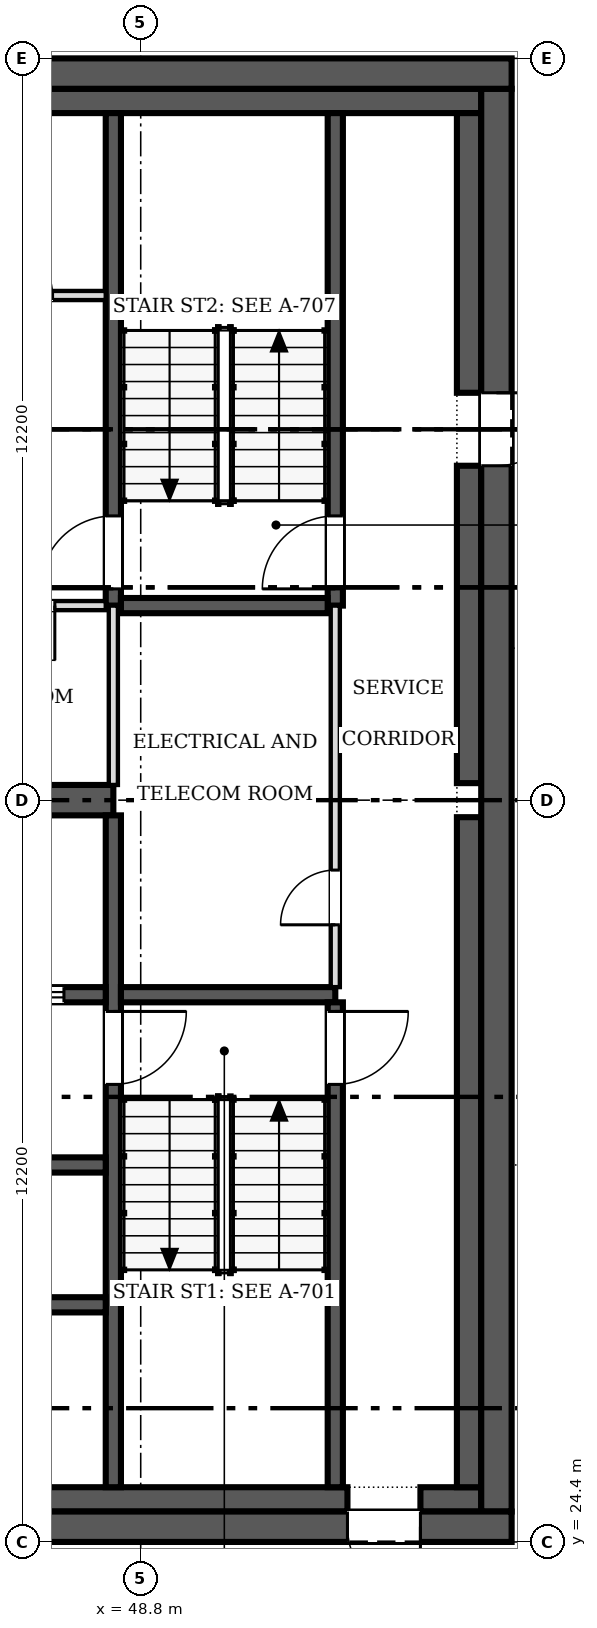
"""IFC4 building model, lengths in metres.
Left out: names, types, materials, properties, quantities, classifications, styles, units other than length and angle.
Written with IfcOpenShell. Run it as: python <this file> out.ifc"""

import sys

from ifc_helpers import new_model, si_unit, direction, frame, frame_2d, origin, place, context, subcontext, project, spatial, rectangle, extrude, source, transform, mapped, element, fill, save


model = new_model("IFC4")
c1 = context("Model", 3, precision=1e-05, world=origin(), true_north=direction((0.0, 1.0)))
c2 = subcontext(c1, "Body", "Model", "MODEL_VIEW")
j1 = project(units=[si_unit("LENGTHUNIT", "METRE"), si_unit("PLANEANGLEUNIT", "RADIAN")], contexts=[c1])
p1 = place(None, origin())
s1 = spatial("IfcSite", under=j1, at=p1, CompositionType="ELEMENT")
p2 = place(p1, origin())
s2 = spatial("IfcBuilding", under=s1, at=p2, CompositionType="ELEMENT")
p3 = place(p2, frame((0.0, 0.0, 228.3)))
s3 = spatial("IfcBuildingStorey", under=s2, at=p3, CompositionType="ELEMENT", Elevation=228.3)
p4 = place(p3, frame((54.9, 24.65, 0.0), z_axis=(0.0, 0.0, 1.0), x_axis=(-1.0, 0.0, 0.0)))
e1 = element("IfcWall", 1, at=p4, inside=s3, PredefinedType="SHEAR", context=c2, shape_type="SweptSolid", body=[
    extrude(rectangle(XDim=24.4, YDim=0.5, at=frame_2d((12.2, 0.0))), origin(), (0.0, 0.0, 1.0), 3.8),
])
m1 = source(origin(), c2, "Body", "SweptSolid", [
    extrude(rectangle(XDim=1.2, YDim=2.1, at=frame_2d((0.6, 1.05))), frame((0.0, 0.26, 0.0), z_axis=(0.0, -1.0, 0.0), x_axis=(1.0, 0.0, 0.0)), (0.0, 0.0, 1.0), 0.52),
])
p5 = place(p4, frame((1.5, 0.0, 0.0)))
e2 = element("IfcOpeningElement", 2, at=p5, cuts=e1, PredefinedType="OPENING", context=c2, shape_type="MappedRepresentation", body=[
    mapped(m1, transform((0.0, 0.0, 0.0), scale=1.0)),
])
p6 = place(p3, frame((30.5, 48.55, 0.0), z_axis=(0.0, 0.0, 1.0), x_axis=(1.0, 0.0, 0.0)))
e3 = element("IfcWall", 3, at=p6, inside=s3, PredefinedType="SHEAR", context=c2, shape_type="SweptSolid", body=[
    extrude(rectangle(XDim=24.4, YDim=0.5, at=frame_2d((12.2, 0.0))), origin(), (0.0, 0.0, 1.0), 3.8),
])
p7 = place(p3, frame((54.65, 48.3, 0.0), z_axis=(0.0, 0.0, 1.0), x_axis=(0.0, -1.0, 0.0)))
e4 = element("IfcWall", 4, at=p7, inside=s3, PredefinedType="SHEAR", context=c2, shape_type="SweptSolid", body=[
    extrude(rectangle(XDim=23.4, YDim=0.5, at=frame_2d((11.7, 0.0))), origin(), (0.0, 0.0, 1.0), 3.8),
])
p8 = place(p7, frame((5.0, 0.0, 0.0)))
e5 = element("IfcOpeningElement", 5, at=p8, cuts=e4, PredefinedType="OPENING", context=c2, shape_type="MappedRepresentation", body=[
    mapped(m1, transform((0.0, 0.0, 0.0), scale=1.0)),
])
p9 = place(p3, frame((31.0, 25.1, 0.0), z_axis=(0.0, 0.0, 1.0), x_axis=(1.0, 0.0, 0.0)))
e6 = element("IfcWall", 6, at=p9, inside=s3, PredefinedType="SOLIDWALL", context=c2, shape_type="SweptSolid", body=[
    extrude(rectangle(XDim=21.2, YDim=0.4, at=frame_2d((10.6, 0.0))), origin(), (0.0, 0.0, 1.0), 3.8),
])
p10 = place(p3, frame((53.4, 25.1, 0.0), z_axis=(0.0, 0.0, 1.0), x_axis=(1.0, 0.0, 0.0)))
e7 = element("IfcWall", 7, at=p10, inside=s3, PredefinedType="SOLIDWALL", context=c2, shape_type="SweptSolid", body=[
    extrude(rectangle(XDim=1.0, YDim=0.4, at=frame_2d((0.5, 0.0))), origin(), (0.0, 0.0, 1.0), 3.8),
])
p11 = place(p3, frame((31.0, 48.1, 0.0), z_axis=(0.0, 0.0, 1.0), x_axis=(1.0, 0.0, 0.0)))
e8 = element("IfcWall", 8, at=p11, inside=s3, PredefinedType="SOLIDWALL", context=c2, shape_type="SweptSolid", body=[
    extrude(rectangle(XDim=23.4, YDim=0.4, at=frame_2d((11.7, 0.0))), origin(), (0.0, 0.0, 1.0), 3.8),
])
p12 = place(p3, frame((54.2, 25.3, 0.0), z_axis=(0.0, 0.0, 1.0), x_axis=(0.0, 1.0, 0.0)))
e9 = element("IfcWall", 9, at=p12, inside=s3, PredefinedType="SOLIDWALL", context=c2, shape_type="SweptSolid", body=[
    extrude(rectangle(XDim=11.02, YDim=0.4, at=frame_2d((5.51, 0.0))), origin(), (0.0, 0.0, 1.0), 3.8),
])
p13 = place(p3, frame((54.2, 36.88, 0.0), z_axis=(0.0, 0.0, 1.0), x_axis=(0.0, 1.0, 0.0)))
e10 = element("IfcWall", 10, at=p13, inside=s3, PredefinedType="SOLIDWALL", context=c2, shape_type="SweptSolid", body=[
    extrude(rectangle(XDim=5.22, YDim=0.4, at=frame_2d((2.61, 0.0))), origin(), (0.0, 0.0, 1.0), 3.8),
])
p14 = place(p3, frame((54.2, 43.3, 0.0), z_axis=(0.0, 0.0, 1.0), x_axis=(0.0, 1.0, 0.0)))
e11 = element("IfcWall", 11, at=p14, inside=s3, PredefinedType="SOLIDWALL", context=c2, shape_type="SweptSolid", body=[
    extrude(rectangle(XDim=4.6, YDim=0.4, at=frame_2d((2.3, 0.0))), origin(), (0.0, 0.0, 1.0), 3.8),
])
p15 = place(p3, frame((31.4, 36.6, 0.0), z_axis=(0.0, 0.0, 1.0), x_axis=(1.0, 0.0, 0.0)))
e12 = element("IfcWall", 12, at=p15, inside=s3, PredefinedType="SHEAR", context=c2, shape_type="SweptSolid", body=[
    extrude(rectangle(XDim=16.95, YDim=0.5, at=frame_2d((8.475, 0.0))), origin(), (0.0, 0.0, 1.0), 3.8),
])
p16 = place(p3, frame((48.35, 36.35, 0.0), z_axis=(0.0, 0.0, 1.0), x_axis=(0.0, -1.0, 0.0)))
e13 = element("IfcWall", 13, at=p16, inside=s3, PredefinedType="SOLIDWALL", context=c2, shape_type="SweptSolid", body=[
    extrude(rectangle(XDim=11.05, YDim=0.25, at=frame_2d((5.525, 0.0))), origin(), (0.0, 0.0, 1.0), 3.8),
])
m2 = source(origin(), c2, "Body", "SweptSolid", [
    extrude(rectangle(XDim=1.2, YDim=2.1, at=frame_2d((0.6, 1.05))), frame((0.0, 0.135, 0.0), z_axis=(0.0, -1.0, 0.0), x_axis=(1.0, 0.0, 0.0)), (0.0, 0.0, 1.0), 0.27),
])
p17 = place(p16, frame((3.225, 0.0, 0.0)))
e14 = element("IfcOpeningElement", 14, at=p17, cuts=e13, PredefinedType="OPENING", context=c2, shape_type="MappedRepresentation", body=[
    mapped(m2, transform((0.0, 0.0, 0.0), scale=1.0)),
])
p18 = place(p3, frame((48.225, 33.4, 0.0), z_axis=(0.0, 0.0, 1.0), x_axis=(-1.0, 0.0, 0.0)))
e15 = element("IfcWall", 15, at=p18, inside=s3, PredefinedType="SOLIDWALL", context=c2, shape_type="SweptSolid", body=[
    extrude(rectangle(XDim=5.275, YDim=0.25, at=frame_2d((2.638, 0.0))), origin(), (0.0, 0.0, 1.0), 3.8),
])
p19 = place(p18, frame((3.512, 0.0, 0.0)))
e16 = element("IfcOpeningElement", 16, at=p19, cuts=e15, PredefinedType="OPENING", context=c2, shape_type="MappedRepresentation", body=[
    mapped(m2, transform((0.0, 0.0, 0.0), scale=1.0)),
])
p20 = place(p18, frame((0.688, 0.0, 0.0)))
e17 = element("IfcOpeningElement", 17, at=p20, cuts=e15, PredefinedType="OPENING", context=c2, shape_type="MappedRepresentation", body=[
    mapped(m2, transform((0.0, 0.0, 0.0), scale=1.0)),
])
p21 = place(p3, frame((48.475, 33.4, 0.0), z_axis=(0.0, 0.0, 1.0), x_axis=(1.0, 0.0, 0.0)))
e18 = element("IfcWall", 18, at=p21, inside=s3, PredefinedType="SOLIDWALL", context=c2, shape_type="SweptSolid", body=[
    extrude(rectangle(XDim=3.525, YDim=0.25, at=frame_2d((1.762, 0.0))), origin(), (0.0, 0.0, 1.0), 3.8),
])
p22 = place(p3, frame((48.35, 47.9, 0.0), z_axis=(0.0, 0.0, 1.0), x_axis=(0.0, -1.0, 0.0)))
e19 = element("IfcWall", 19, at=p22, inside=s3, PredefinedType="SOLIDWALL", context=c2, shape_type="SweptSolid", body=[
    extrude(rectangle(XDim=8.1, YDim=0.25, at=frame_2d((4.05, 0.0))), origin(), (0.0, 0.0, 1.0), 3.8),
])
p23 = place(p22, frame((6.625, 0.0, 0.0)))
e20 = element("IfcOpeningElement", 20, at=p23, cuts=e19, PredefinedType="OPENING", context=c2, shape_type="MappedRepresentation", body=[
    mapped(m2, transform((0.0, 0.0, 0.0), scale=1.0)),
])
p24 = place(p3, frame((52.0, 25.3, 0.0), z_axis=(0.0, 0.0, 1.0), x_axis=(0.0, 1.0, 0.0)))
e21 = element("IfcWall", 21, at=p24, inside=s3, PredefinedType="SOLIDWALL", context=c2, shape_type="SweptSolid", body=[
    extrude(rectangle(XDim=7.975, YDim=0.25, at=frame_2d((3.987, 0.0))), origin(), (0.0, 0.0, 1.0), 3.8),
])
p25 = place(p24, frame((6.625, 0.0, 0.0)))
e22 = element("IfcOpeningElement", 22, at=p25, cuts=e21, PredefinedType="OPENING", context=c2, shape_type="MappedRepresentation", body=[
    mapped(m2, transform((0.0, 0.0, 0.0), scale=1.0)),
])
p26 = place(p3, frame((52.0, 39.8, 0.0), z_axis=(0.0, 0.0, 1.0), x_axis=(0.0, 1.0, 0.0)))
e23 = element("IfcWall", 23, at=p26, inside=s3, PredefinedType="SOLIDWALL", context=c2, shape_type="SweptSolid", body=[
    extrude(rectangle(XDim=8.1, YDim=0.25, at=frame_2d((4.05, 0.0))), origin(), (0.0, 0.0, 1.0), 3.8),
])
p27 = place(p26, frame((0.275, 0.0, 0.0)))
e24 = element("IfcOpeningElement", 24, at=p27, cuts=e23, PredefinedType="OPENING", context=c2, shape_type="MappedRepresentation", body=[
    mapped(m2, transform((0.0, 0.0, 0.0), scale=1.0)),
])
for number, where, z_axis, x_axis in (
    (25, (42.95, 28.3, 0.0), (0.0, 0.0, 1.0), (1.0, 0.0, 0.0)),
    (26, (42.95, 30.6, 0.0), (0.0, 0.0, 1.0), (1.0, 0.0, 0.0)),
):
    element("IfcWall", number, at=place(p3, frame(where, z_axis=z_axis, x_axis=x_axis)), inside=s3, PredefinedType="SOLIDWALL", context=c2, shape_type="SweptSolid", body=[
        extrude(rectangle(XDim=5.275, YDim=0.25, at=frame_2d((2.638, 0.0))), origin(), (0.0, 0.0, 1.0), 3.8),
    ])
p28 = place(p3, frame((48.475, 39.8, 0.0), z_axis=(0.0, 0.0, 1.0), x_axis=(1.0, 0.0, 0.0)))
e27 = element("IfcWall", 27, at=p28, inside=s3, PredefinedType="SOLIDWALL", context=c2, shape_type="SweptSolid", body=[
    extrude(rectangle(XDim=3.4, YDim=0.25, at=frame_2d((1.7, 0.0))), origin(), (0.0, 0.0, 1.0), 3.8),
])
p29 = place(p3, frame((52.0, 33.525, 0.0), z_axis=(0.0, 0.0, 1.0), x_axis=(0.0, 1.0, 0.0)))
e28 = element("IfcWall", 28, at=p29, inside=s3, PredefinedType="PARTITIONING", context=c2, shape_type="SweptSolid", body=[
    extrude(rectangle(XDim=6.275, YDim=0.15, at=frame_2d((3.138, 0.0))), origin(), (0.0, 0.0, 1.0), 3.5),
])
m3 = source(origin(), c2, "Body", "SweptSolid", [
    extrude(rectangle(XDim=0.9, YDim=2.1, at=frame_2d((0.45, 1.05))), frame((0.0, 0.085, 0.0), z_axis=(0.0, -1.0, 0.0), x_axis=(1.0, 0.0, 0.0)), (0.0, 0.0, 1.0), 0.17),
])
p30 = place(p29, frame((1.025, 0.0, 0.0)))
e29 = element("IfcOpeningElement", 29, at=p30, cuts=e28, PredefinedType="OPENING", context=c2, shape_type="MappedRepresentation", body=[
    mapped(m3, transform((0.0, 0.0, 0.0), scale=1.0)),
])
p31 = place(p3, frame((48.35, 36.85, 0.0), z_axis=(0.0, 0.0, 1.0), x_axis=(0.0, 1.0, 0.0)))
e30 = element("IfcWall", 30, at=p31, inside=s3, PredefinedType="PARTITIONING", context=c2, shape_type="SweptSolid", body=[
    extrude(rectangle(XDim=2.95, YDim=0.15, at=frame_2d((1.475, 0.0))), origin(), (0.0, 0.0, 1.0), 3.5),
])
p32 = place(p3, frame((48.225, 39.8, 0.0), z_axis=(0.0, 0.0, 1.0), x_axis=(-1.0, 0.0, 0.0)))
e31 = element("IfcWall", 31, at=p32, inside=s3, PredefinedType="PARTITIONING", context=c2, shape_type="SweptSolid", body=[
    extrude(rectangle(XDim=2.625, YDim=0.15, at=frame_2d((1.312, 0.0))), origin(), (0.0, 0.0, 1.0), 3.5),
])
p33 = place(p32, frame((0.837, 0.0, 0.0)))
e32 = element("IfcOpeningElement", 32, at=p33, cuts=e31, PredefinedType="OPENING", context=c2, shape_type="MappedRepresentation", body=[
    mapped(m3, transform((0.0, 0.0, 0.0), scale=1.0)),
])
p34 = place(p3, frame((45.6, 44.9, 0.0), z_axis=(0.0, 0.0, 1.0), x_axis=(1.0, 0.0, 0.0)))
e33 = element("IfcWall", 33, at=p34, inside=s3, PredefinedType="PARTITIONING", context=c2, shape_type="SweptSolid", body=[
    extrude(rectangle(XDim=2.625, YDim=0.15, at=frame_2d((1.312, 0.0))), origin(), (0.0, 0.0, 1.0), 3.5),
])
p35 = place(p34, frame((0.85, 0.0, 0.0)))
e34 = element("IfcOpeningElement", 34, at=p35, cuts=e33, PredefinedType="OPENING", context=c2, shape_type="MappedRepresentation", body=[
    mapped(m3, transform((0.0, 0.0, 0.0), scale=1.0)),
])
m4 = source(origin(), c2, "Body", "SweptSolid", [
    extrude(rectangle(XDim=1.2, YDim=2.1, at=frame_2d((0.6, 1.05))), frame((0.0, 0.025, 0.0), z_axis=(0.0, -1.0, 0.0), x_axis=(1.0, 0.0, 0.0)), (0.0, 0.0, 1.0), 0.05),
])
p36 = place(p5, origin())
e35 = element("IfcDoor", 35, at=p36, inside=s3, OperationType="SINGLE_SWING_LEFT", PredefinedType="DOOR", context=c2, shape_type="MappedRepresentation", body=[
    mapped(m4, transform((0.0, 0.0, 0.0), scale=1.0)),
])
fill(e2, e35)
p37 = place(p8, origin())
e36 = element("IfcDoor", 36, at=p37, inside=s3, OperationType="SINGLE_SWING_LEFT", PredefinedType="DOOR", context=c2, shape_type="MappedRepresentation", body=[
    mapped(m4, transform((0.0, 0.0, 0.0), scale=1.0)),
])
fill(e5, e36)
p38 = place(p17, origin())
e37 = element("IfcDoor", 37, at=p38, inside=s3, OperationType="SINGLE_SWING_LEFT", PredefinedType="DOOR", context=c2, shape_type="MappedRepresentation", body=[
    mapped(m4, transform((0.0, 0.0, 0.0), scale=1.0)),
])
fill(e14, e37)
p39 = place(p20, origin())
e38 = element("IfcDoor", 38, at=p39, inside=s3, OperationType="DOUBLE_DOOR_SLIDING", PredefinedType="DOOR", context=c2, shape_type="MappedRepresentation", body=[
    mapped(m4, transform((0.0, 0.0, 0.0), scale=1.0)),
])
fill(e17, e38)
p40 = place(p23, origin())
e39 = element("IfcDoor", 39, at=p40, inside=s3, OperationType="SINGLE_SWING_RIGHT", PredefinedType="DOOR", context=c2, shape_type="MappedRepresentation", body=[
    mapped(m4, transform((0.0, 0.0, 0.0), scale=1.0)),
])
fill(e20, e39)
p41 = place(p25, origin())
e40 = element("IfcDoor", 40, at=p41, inside=s3, OperationType="SINGLE_SWING_RIGHT", PredefinedType="DOOR", context=c2, shape_type="MappedRepresentation", body=[
    mapped(m4, transform((0.0, 0.0, 0.0), scale=1.0)),
])
fill(e22, e40)
p42 = place(p27, origin())
e41 = element("IfcDoor", 41, at=p42, inside=s3, OperationType="SINGLE_SWING_LEFT", PredefinedType="DOOR", context=c2, shape_type="MappedRepresentation", body=[
    mapped(m4, transform((0.0, 0.0, 0.0), scale=1.0)),
])
fill(e24, e41)
m5 = source(origin(), c2, "Body", "SweptSolid", [
    extrude(rectangle(XDim=0.9, YDim=2.1, at=frame_2d((0.45, 1.05))), frame((0.0, 0.025, 0.0), z_axis=(0.0, -1.0, 0.0), x_axis=(1.0, 0.0, 0.0)), (0.0, 0.0, 1.0), 0.05),
])
p43 = place(p30, origin())
e42 = element("IfcDoor", 42, at=p43, inside=s3, OperationType="SINGLE_SWING_LEFT", PredefinedType="DOOR", context=c2, shape_type="MappedRepresentation", body=[
    mapped(m5, transform((0.0, 0.0, 0.0), scale=1.0)),
])
fill(e29, e42)
p44 = place(p33, origin())
e43 = element("IfcDoor", 43, at=p44, inside=s3, OperationType="SINGLE_SWING_LEFT", PredefinedType="DOOR", context=c2, shape_type="MappedRepresentation", body=[
    mapped(m5, transform((0.0, 0.0, 0.0), scale=1.0)),
])
fill(e32, e43)
save(model, sys.argv[1])
